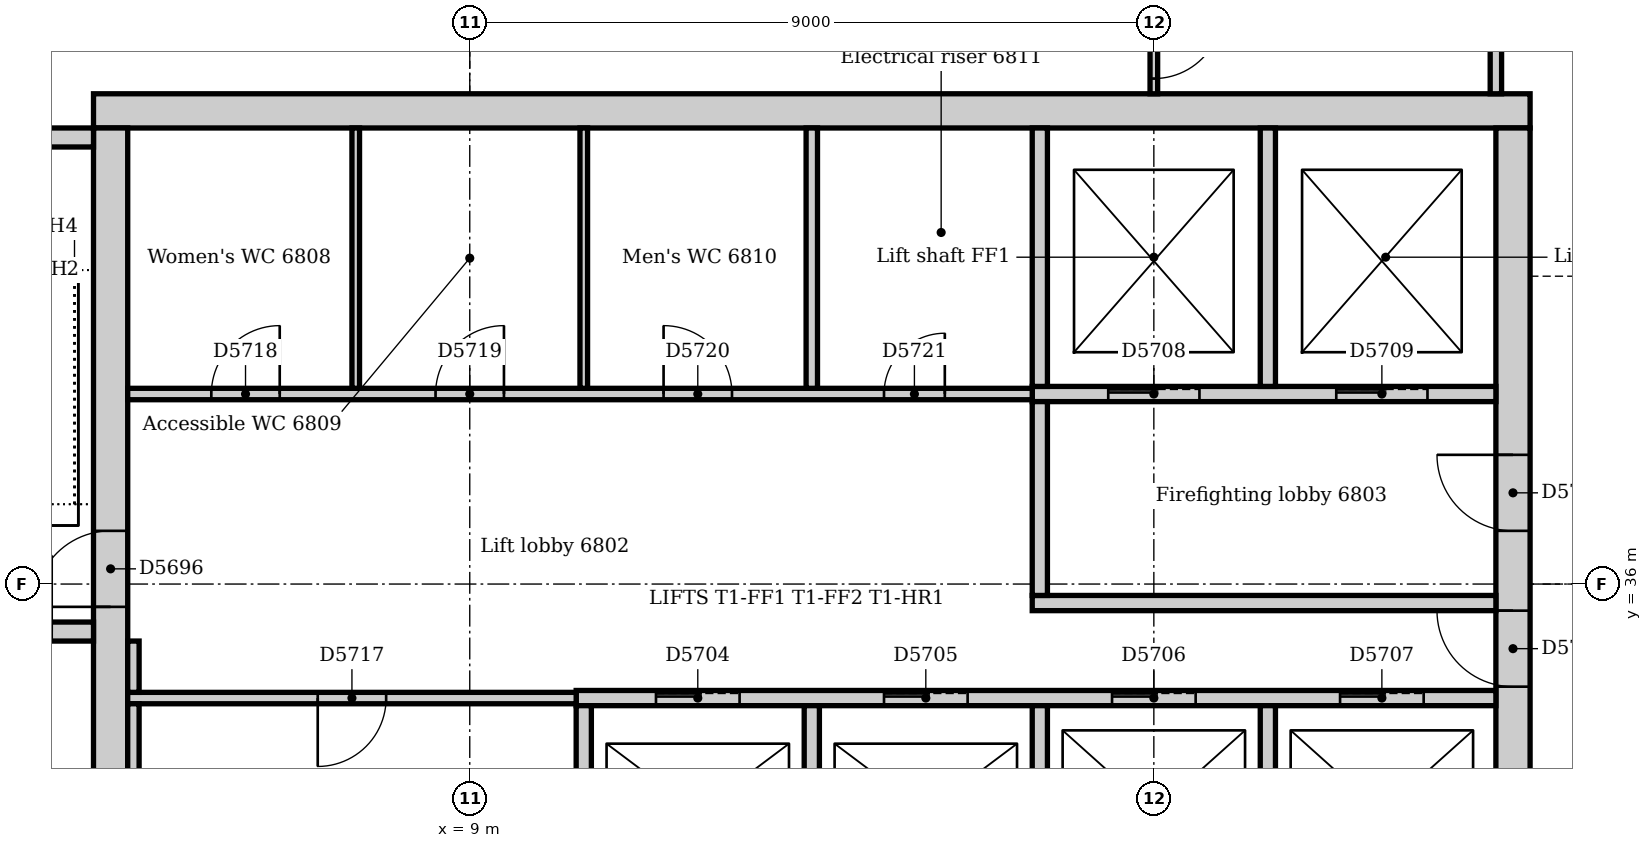
"""IFC4 building model, lengths in metres.
Left out: names, types, materials, properties, quantities, classifications, styles, units other than length and angle.
Written with IfcOpenShell. Run it as: python <this file> out.ifc"""

import sys

from ifc_helpers import new_model, si_unit, direction, frame, frame_2d, origin, place, context, subcontext, project, spatial, rectangle, extrude, element, fill, save


model = new_model("IFC4")
c1 = context("Model", 3, precision=1e-05, world=origin(), true_north=direction((0.0, 1.0)))
c2 = subcontext(c1, "Body", "Model", "MODEL_VIEW")
j1 = project(units=[si_unit("LENGTHUNIT", "METRE"), si_unit("PLANEANGLEUNIT", "RADIAN")], contexts=[c1])
p1 = place(None, origin())
s1 = spatial("IfcSite", under=j1, at=p1, CompositionType="ELEMENT")
p2 = place(p1, origin())
s2 = spatial("IfcBuilding", under=s1, at=p2, CompositionType="ELEMENT")
p3 = place(p2, frame((0.0, 0.0, 283.0)))
s3 = spatial("IfcBuildingStorey", under=s2, at=p3, CompositionType="ELEMENT", Elevation=283.0)
p4 = place(p3, frame((22.95, 42.225, 0.0), z_axis=(0.0, 0.0, 1.0), x_axis=(-1.0, 0.0, 0.0)))
e1 = element("IfcWall", 1, at=p4, inside=s3, PredefinedType="SOLIDWALL", context=c2, shape_type="SweptSolid", body=[
    extrude(rectangle(XDim=18.9, YDim=0.45, at=frame_2d((9.45, 0.0))), origin(), (0.0, 0.0, 1.0), 8.0),
])
p5 = place(p3, frame((22.725, 31.5, 0.0), z_axis=(0.0, 0.0, 1.0), x_axis=(0.0, 1.0, 0.0)))
e2 = element("IfcWall", 2, at=p5, inside=s3, PredefinedType="SOLIDWALL", context=c2, shape_type="SweptSolid", body=[
    extrude(rectangle(XDim=10.5, YDim=0.45, at=frame_2d((5.25, 0.0))), origin(), (0.0, 0.0, 1.0), 8.0),
])
p6 = place(p5, frame((3.15, 0.0, 0.0)))
e3 = element("IfcOpeningElement", 3, at=p6, cuts=e2, PredefinedType="OPENING", context=c2, shape_type="SweptSolid", body=[
    extrude(rectangle(XDim=1.0, YDim=2.1, at=frame_2d((0.5, 1.05))), frame((0.0, 0.235, 0.0), z_axis=(0.0, -1.0, 0.0), x_axis=(1.0, 0.0, 0.0)), (0.0, 0.0, 1.0), 0.47),
])
p7 = place(p5, frame((5.2, 0.0, 0.0)))
e4 = element("IfcOpeningElement", 4, at=p7, cuts=e2, PredefinedType="OPENING", context=c2, shape_type="SweptSolid", body=[
    extrude(rectangle(XDim=1.0, YDim=2.1, at=frame_2d((0.5, 1.05))), frame((0.0, 0.235, 0.0), z_axis=(0.0, -1.0, 0.0), x_axis=(1.0, 0.0, 0.0)), (0.0, 0.0, 1.0), 0.47),
])
p8 = place(p3, frame((4.275, 42.0, 0.0), z_axis=(0.0, 0.0, 1.0), x_axis=(0.0, -1.0, 0.0)))
e5 = element("IfcWall", 5, at=p8, inside=s3, PredefinedType="SOLIDWALL", context=c2, shape_type="SweptSolid", body=[
    extrude(rectangle(XDim=10.5, YDim=0.45, at=frame_2d((5.25, 0.0))), origin(), (0.0, 0.0, 1.0), 8.0),
])
p9 = place(p8, frame((5.3, 0.0, 0.0)))
e6 = element("IfcOpeningElement", 6, at=p9, cuts=e5, PredefinedType="OPENING", context=c2, shape_type="SweptSolid", body=[
    extrude(rectangle(XDim=1.0, YDim=2.1, at=frame_2d((0.5, 1.05))), frame((0.0, 0.235, 0.0), z_axis=(0.0, -1.0, 0.0), x_axis=(1.0, 0.0, 0.0)), (0.0, 0.0, 1.0), 0.47),
])
p10 = place(p3, frame((0.36, 35.375, 0.0), z_axis=(0.0, 0.0, 1.0), x_axis=(1.0, 0.0, 0.0)))
e7 = element("IfcWall", 7, at=p10, inside=s3, PredefinedType="SOLIDWALL", context=c2, shape_type="SweptSolid", body=[
    extrude(rectangle(XDim=3.69, YDim=0.25, at=frame_2d((1.845, 0.0))), origin(), (0.0, 0.0, 1.0), 8.0),
])
p11 = place(p10, frame((2.14, 0.0, 0.0)))
e8 = element("IfcOpeningElement", 8, at=p11, cuts=e7, PredefinedType="OPENING", context=c2, shape_type="SweptSolid", body=[
    extrude(rectangle(XDim=1.0, YDim=2.1, at=frame_2d((0.5, 1.05))), frame((0.0, 0.135, 0.0), z_axis=(0.0, -1.0, 0.0), x_axis=(1.0, 0.0, 0.0)), (0.0, 0.0, 1.0), 0.27),
])
p12 = place(p3, frame((4.05, 41.875, 0.0), z_axis=(0.0, 0.0, 1.0), x_axis=(-1.0, 0.0, 0.0)))
e9 = element("IfcWall", 9, at=p12, inside=s3, PredefinedType="SOLIDWALL", context=c2, shape_type="SweptSolid", body=[
    extrude(rectangle(XDim=3.69, YDim=0.25, at=frame_2d((1.845, 0.0))), origin(), (0.0, 0.0, 1.0), 8.0),
])
p13 = place(p3, frame((16.4, 35.75, 0.0), z_axis=(0.0, 0.0, 1.0), x_axis=(1.0, 0.0, 0.0)))
e10 = element("IfcWall", 10, at=p13, inside=s3, PredefinedType="PARTITIONING", context=c2, shape_type="SweptSolid", body=[
    extrude(rectangle(XDim=6.1, YDim=0.2, at=frame_2d((3.05, 0.0))), origin(), (0.0, 0.0, 1.0), 7.7),
])
p14 = place(p3, frame((16.4, 38.5, 0.0), z_axis=(0.0, 0.0, 1.0), x_axis=(1.0, 0.0, 0.0)))
e11 = element("IfcWall", 11, at=p14, inside=s3, PredefinedType="PARTITIONING", context=c2, shape_type="SweptSolid", body=[
    extrude(rectangle(XDim=6.1, YDim=0.2, at=frame_2d((3.05, 0.0))), origin(), (0.0, 0.0, 1.0), 7.7),
])
p15 = place(p14, frame((1.0, 0.0, 0.0)))
e12 = element("IfcOpeningElement", 12, at=p15, cuts=e11, PredefinedType="OPENING", context=c2, shape_type="SweptSolid", body=[
    extrude(rectangle(XDim=1.2, YDim=2.1, at=frame_2d((0.6, 1.05))), frame((0.0, 0.11, 0.0), z_axis=(0.0, -1.0, 0.0), x_axis=(1.0, 0.0, 0.0)), (0.0, 0.0, 1.0), 0.22),
])
p16 = place(p14, frame((4.0, 0.0, 0.0)))
e13 = element("IfcOpeningElement", 13, at=p16, cuts=e11, PredefinedType="OPENING", context=c2, shape_type="SweptSolid", body=[
    extrude(rectangle(XDim=1.2, YDim=2.1, at=frame_2d((0.6, 1.05))), frame((0.0, 0.11, 0.0), z_axis=(0.0, -1.0, 0.0), x_axis=(1.0, 0.0, 0.0)), (0.0, 0.0, 1.0), 0.22),
])
p17 = place(p3, frame((16.5, 35.85, 0.0), z_axis=(0.0, 0.0, 1.0), x_axis=(0.0, 1.0, 0.0)))
e14 = element("IfcWall", 14, at=p17, inside=s3, PredefinedType="PARTITIONING", context=c2, shape_type="SweptSolid", body=[
    extrude(rectangle(XDim=2.55, YDim=0.2, at=frame_2d((1.275, 0.0))), origin(), (0.0, 0.0, 1.0), 7.7),
])
p18 = place(p3, frame((10.4, 34.5, 0.0), z_axis=(0.0, 0.0, 1.0), x_axis=(1.0, 0.0, 0.0)))
e15 = element("IfcWall", 15, at=p18, inside=s3, PredefinedType="PARTITIONING", context=c2, shape_type="SweptSolid", body=[
    extrude(rectangle(XDim=12.1, YDim=0.2, at=frame_2d((6.05, 0.0))), origin(), (0.0, 0.0, 1.0), 7.7),
])
p19 = place(p18, frame((1.05, 0.0, 0.0)))
e16 = element("IfcOpeningElement", 16, at=p19, cuts=e15, PredefinedType="OPENING", context=c2, shape_type="SweptSolid", body=[
    extrude(rectangle(XDim=1.1, YDim=2.1, at=frame_2d((0.55, 1.05))), frame((0.0, 0.11, 0.0), z_axis=(0.0, -1.0, 0.0), x_axis=(1.0, 0.0, 0.0)), (0.0, 0.0, 1.0), 0.22),
])
p20 = place(p18, frame((4.05, 0.0, 0.0)))
e17 = element("IfcOpeningElement", 17, at=p20, cuts=e15, PredefinedType="OPENING", context=c2, shape_type="SweptSolid", body=[
    extrude(rectangle(XDim=1.1, YDim=2.1, at=frame_2d((0.55, 1.05))), frame((0.0, 0.11, 0.0), z_axis=(0.0, -1.0, 0.0), x_axis=(1.0, 0.0, 0.0)), (0.0, 0.0, 1.0), 0.22),
])
p21 = place(p18, frame((7.05, 0.0, 0.0)))
e18 = element("IfcOpeningElement", 18, at=p21, cuts=e15, PredefinedType="OPENING", context=c2, shape_type="SweptSolid", body=[
    extrude(rectangle(XDim=1.1, YDim=2.1, at=frame_2d((0.55, 1.05))), frame((0.0, 0.11, 0.0), z_axis=(0.0, -1.0, 0.0), x_axis=(1.0, 0.0, 0.0)), (0.0, 0.0, 1.0), 0.22),
])
p22 = place(p18, frame((10.05, 0.0, 0.0)))
e19 = element("IfcOpeningElement", 19, at=p22, cuts=e15, PredefinedType="OPENING", context=c2, shape_type="SweptSolid", body=[
    extrude(rectangle(XDim=1.1, YDim=2.1, at=frame_2d((0.55, 1.05))), frame((0.0, 0.11, 0.0), z_axis=(0.0, -1.0, 0.0), x_axis=(1.0, 0.0, 0.0)), (0.0, 0.0, 1.0), 0.22),
])
for number, where, z_axis, x_axis in (
    (20, (10.5, 31.75, 0.0), (0.0, 0.0, 1.0), (0.0, 1.0, 0.0)),
    (21, (13.5, 31.75, 0.0), (0.0, 0.0, 1.0), (0.0, 1.0, 0.0)),
    (22, (16.5, 31.75, 0.0), (0.0, 0.0, 1.0), (0.0, 1.0, 0.0)),
    (23, (19.5, 31.75, 0.0), (0.0, 0.0, 1.0), (0.0, 1.0, 0.0)),
):
    element("IfcWall", number, at=place(p3, frame(where, z_axis=z_axis, x_axis=x_axis)), inside=s3, PredefinedType="PARTITIONING", context=c2, shape_type="SweptSolid", body=[
        extrude(rectangle(XDim=2.65, YDim=0.2, at=frame_2d((1.325, 0.0))), origin(), (0.0, 0.0, 1.0), 7.7),
    ])
for number, where, z_axis, x_axis in (
    (24, (16.5, 38.6, 0.0), (0.0, 0.0, 1.0), (0.0, 1.0, 0.0)),
    (25, (19.5, 38.6, 0.0), (0.0, 0.0, 1.0), (0.0, 1.0, 0.0)),
):
    element("IfcWall", number, at=place(p3, frame(where, z_axis=z_axis, x_axis=x_axis)), inside=s3, PredefinedType="PARTITIONING", context=c2, shape_type="SweptSolid", body=[
        extrude(rectangle(XDim=3.4, YDim=0.2, at=frame_2d((1.7, 0.0))), origin(), (0.0, 0.0, 1.0), 7.7),
    ])
p23 = place(p3, frame((4.5, 38.5, 0.0), z_axis=(0.0, 0.0, 1.0), x_axis=(1.0, 0.0, 0.0)))
e26 = element("IfcWall", 26, at=p23, inside=s3, PredefinedType="PARTITIONING", context=c2, shape_type="SweptSolid", body=[
    extrude(rectangle(XDim=11.9, YDim=0.15, at=frame_2d((5.95, 0.0))), origin(), (0.0, 0.0, 1.0), 7.7),
])
p24 = place(p23, frame((1.1, 0.0, 0.0)))
e27 = element("IfcOpeningElement", 27, at=p24, cuts=e26, PredefinedType="OPENING", context=c2, shape_type="SweptSolid", body=[
    extrude(rectangle(XDim=0.9, YDim=2.1, at=frame_2d((0.45, 1.05))), frame((0.0, 0.085, 0.0), z_axis=(0.0, -1.0, 0.0), x_axis=(1.0, 0.0, 0.0)), (0.0, 0.0, 1.0), 0.17),
])
p25 = place(p23, frame((4.05, 0.0, 0.0)))
e28 = element("IfcOpeningElement", 28, at=p25, cuts=e26, PredefinedType="OPENING", context=c2, shape_type="SweptSolid", body=[
    extrude(rectangle(XDim=0.9, YDim=2.1, at=frame_2d((0.45, 1.05))), frame((0.0, 0.085, 0.0), z_axis=(0.0, -1.0, 0.0), x_axis=(1.0, 0.0, 0.0)), (0.0, 0.0, 1.0), 0.17),
])
p26 = place(p23, frame((7.05, 0.0, 0.0)))
e29 = element("IfcOpeningElement", 29, at=p26, cuts=e26, PredefinedType="OPENING", context=c2, shape_type="SweptSolid", body=[
    extrude(rectangle(XDim=0.9, YDim=2.1, at=frame_2d((0.45, 1.05))), frame((0.0, 0.085, 0.0), z_axis=(0.0, -1.0, 0.0), x_axis=(1.0, 0.0, 0.0)), (0.0, 0.0, 1.0), 0.17),
])
p27 = place(p23, frame((9.95, 0.0, 0.0)))
e30 = element("IfcOpeningElement", 30, at=p27, cuts=e26, PredefinedType="OPENING", context=c2, shape_type="SweptSolid", body=[
    extrude(rectangle(XDim=0.8, YDim=2.1, at=frame_2d((0.4, 1.05))), frame((0.0, 0.085, 0.0), z_axis=(0.0, -1.0, 0.0), x_axis=(1.0, 0.0, 0.0)), (0.0, 0.0, 1.0), 0.17),
])
p28 = place(p3, frame((4.5, 34.5, 0.0), z_axis=(0.0, 0.0, 1.0), x_axis=(1.0, 0.0, 0.0)))
e31 = element("IfcWall", 31, at=p28, inside=s3, PredefinedType="PARTITIONING", context=c2, shape_type="SweptSolid", body=[
    extrude(rectangle(XDim=5.9, YDim=0.15, at=frame_2d((2.95, 0.0))), origin(), (0.0, 0.0, 1.0), 7.7),
])
p29 = place(p28, frame((2.5, 0.0, 0.0)))
e32 = element("IfcOpeningElement", 32, at=p29, cuts=e31, PredefinedType="OPENING", context=c2, shape_type="SweptSolid", body=[
    extrude(rectangle(XDim=0.9, YDim=2.1, at=frame_2d((0.45, 1.05))), frame((0.0, 0.085, 0.0), z_axis=(0.0, -1.0, 0.0), x_axis=(1.0, 0.0, 0.0)), (0.0, 0.0, 1.0), 0.17),
])
p30 = place(p3, frame((4.575, 34.575, 0.0), z_axis=(0.0, 0.0, 1.0), x_axis=(0.0, 1.0, 0.0)))
e33 = element("IfcWall", 33, at=p30, inside=s3, PredefinedType="PARTITIONING", context=c2, shape_type="SweptSolid", body=[
    extrude(rectangle(XDim=0.675, YDim=0.15, at=frame_2d((0.338, 0.0))), origin(), (0.0, 0.0, 1.0), 7.7),
])
p31 = place(p3, frame((4.575, 31.75, 0.0), z_axis=(0.0, 0.0, 1.0), x_axis=(0.0, 1.0, 0.0)))
e34 = element("IfcWall", 34, at=p31, inside=s3, PredefinedType="PARTITIONING", context=c2, shape_type="SweptSolid", body=[
    extrude(rectangle(XDim=2.675, YDim=0.15, at=frame_2d((1.337, 0.0))), origin(), (0.0, 0.0, 1.0), 7.7),
])
p32 = place(p3, frame((22.5, 42.45, 0.0), z_axis=(0.0, 0.0, 1.0), x_axis=(0.0, 1.0, 0.0)))
e35 = element("IfcWall", 35, at=p32, inside=s3, PredefinedType="PARTITIONING", context=c2, shape_type="SweptSolid", body=[
    extrude(rectangle(XDim=2.475, YDim=0.15, at=frame_2d((1.238, 0.0))), origin(), (0.0, 0.0, 1.0), 7.7),
])
p33 = place(p3, frame((13.5, 38.575, 0.0), z_axis=(0.0, 0.0, 1.0), x_axis=(0.0, 1.0, 0.0)))
e36 = element("IfcWall", 36, at=p33, inside=s3, PredefinedType="PARTITIONING", context=c2, shape_type="SweptSolid", body=[
    extrude(rectangle(XDim=3.425, YDim=0.15, at=frame_2d((1.712, 0.0))), origin(), (0.0, 0.0, 1.0), 7.7),
])
p34 = place(p3, frame((18.0, 42.45, 0.0), z_axis=(0.0, 0.0, 1.0), x_axis=(0.0, 1.0, 0.0)))
e37 = element("IfcWall", 37, at=p34, inside=s3, PredefinedType="PARTITIONING", context=c2, shape_type="SweptSolid", body=[
    extrude(rectangle(XDim=1.3, YDim=0.1, at=frame_2d((0.65, 0.0))), origin(), (0.0, 0.0, 1.0), 7.502),
])
p35 = place(p34, frame((0.2, 0.0, 0.0)))
e38 = element("IfcOpeningElement", 38, at=p35, cuts=e37, PredefinedType="OPENING", context=c2, shape_type="SweptSolid", body=[
    extrude(rectangle(XDim=0.9, YDim=2.1, at=frame_2d((0.45, 1.05))), frame((0.0, 0.06, 0.0), z_axis=(0.0, -1.0, 0.0), x_axis=(1.0, 0.0, 0.0)), (0.0, 0.0, 1.0), 0.12),
])
for number, where, z_axis, x_axis in (
    (39, (7.5, 38.575, 0.0), (0.0, 0.0, 1.0), (0.0, 1.0, 0.0)),
    (40, (10.5, 38.575, 0.0), (0.0, 0.0, 1.0), (0.0, 1.0, 0.0)),
):
    element("IfcWall", number, at=place(p3, frame(where, z_axis=z_axis, x_axis=x_axis)), inside=s3, PredefinedType="PARTITIONING", context=c2, shape_type="SweptSolid", body=[
        extrude(rectangle(XDim=3.425, YDim=0.1, at=frame_2d((1.712, 0.0))), origin(), (0.0, 0.0, 1.0), 7.7),
    ])
p36 = place(p9, frame((1.0, 0.0, 0.0), z_axis=(0.0, 0.0, 1.0), x_axis=(-1.0, 0.0, 0.0)))
e41 = element("IfcDoor", 41, at=p36, inside=s3, OperationType="SINGLE_SWING_LEFT", PredefinedType="DOOR", context=c2, shape_type="SweptSolid", body=[
    extrude(rectangle(XDim=1.0, YDim=2.1, at=frame_2d((0.5, 1.05))), frame((0.0, 0.025, 0.0), z_axis=(0.0, -1.0, 0.0), x_axis=(1.0, 0.0, 0.0)), (0.0, 0.0, 1.0), 0.05),
])
fill(e6, e41)
p37 = place(p19, origin())
e42 = element("IfcDoor", 42, at=p37, inside=s3, OperationType="SLIDING_TO_LEFT", PredefinedType="DOOR", context=c2, shape_type="SweptSolid", body=[
    extrude(rectangle(XDim=1.1, YDim=2.1, at=frame_2d((0.55, 1.05))), frame((0.0, 0.025, 0.0), z_axis=(0.0, -1.0, 0.0), x_axis=(1.0, 0.0, 0.0)), (0.0, 0.0, 1.0), 0.05),
])
fill(e16, e42)
p38 = place(p20, origin())
e43 = element("IfcDoor", 43, at=p38, inside=s3, OperationType="SLIDING_TO_LEFT", PredefinedType="DOOR", context=c2, shape_type="SweptSolid", body=[
    extrude(rectangle(XDim=1.1, YDim=2.1, at=frame_2d((0.55, 1.05))), frame((0.0, 0.025, 0.0), z_axis=(0.0, -1.0, 0.0), x_axis=(1.0, 0.0, 0.0)), (0.0, 0.0, 1.0), 0.05),
])
fill(e17, e43)
p39 = place(p21, origin())
e44 = element("IfcDoor", 44, at=p39, inside=s3, OperationType="SLIDING_TO_LEFT", PredefinedType="DOOR", context=c2, shape_type="SweptSolid", body=[
    extrude(rectangle(XDim=1.1, YDim=2.1, at=frame_2d((0.55, 1.05))), frame((0.0, 0.025, 0.0), z_axis=(0.0, -1.0, 0.0), x_axis=(1.0, 0.0, 0.0)), (0.0, 0.0, 1.0), 0.05),
])
fill(e18, e44)
p40 = place(p22, origin())
e45 = element("IfcDoor", 45, at=p40, inside=s3, OperationType="SLIDING_TO_LEFT", PredefinedType="DOOR", context=c2, shape_type="SweptSolid", body=[
    extrude(rectangle(XDim=1.1, YDim=2.1, at=frame_2d((0.55, 1.05))), frame((0.0, 0.025, 0.0), z_axis=(0.0, -1.0, 0.0), x_axis=(1.0, 0.0, 0.0)), (0.0, 0.0, 1.0), 0.05),
])
fill(e19, e45)
p41 = place(p15, origin())
e46 = element("IfcDoor", 46, at=p41, inside=s3, OperationType="SLIDING_TO_LEFT", PredefinedType="DOOR", context=c2, shape_type="SweptSolid", body=[
    extrude(rectangle(XDim=1.2, YDim=2.1, at=frame_2d((0.6, 1.05))), frame((0.0, 0.025, 0.0), z_axis=(0.0, -1.0, 0.0), x_axis=(1.0, 0.0, 0.0)), (0.0, 0.0, 1.0), 0.05),
])
fill(e12, e46)
p42 = place(p16, origin())
e47 = element("IfcDoor", 47, at=p42, inside=s3, OperationType="SLIDING_TO_LEFT", PredefinedType="DOOR", context=c2, shape_type="SweptSolid", body=[
    extrude(rectangle(XDim=1.2, YDim=2.1, at=frame_2d((0.6, 1.05))), frame((0.0, 0.025, 0.0), z_axis=(0.0, -1.0, 0.0), x_axis=(1.0, 0.0, 0.0)), (0.0, 0.0, 1.0), 0.05),
])
fill(e13, e47)
p43 = place(p6, origin())
e48 = element("IfcDoor", 48, at=p43, inside=s3, OperationType="SINGLE_SWING_RIGHT", PredefinedType="DOOR", context=c2, shape_type="SweptSolid", body=[
    extrude(rectangle(XDim=1.0, YDim=2.1, at=frame_2d((0.5, 1.05))), frame((0.0, 0.025, 0.0), z_axis=(0.0, -1.0, 0.0), x_axis=(1.0, 0.0, 0.0)), (0.0, 0.0, 1.0), 0.05),
])
fill(e3, e48)
p44 = place(p7, origin())
e49 = element("IfcDoor", 49, at=p44, inside=s3, OperationType="SINGLE_SWING_RIGHT", PredefinedType="DOOR", context=c2, shape_type="SweptSolid", body=[
    extrude(rectangle(XDim=1.0, YDim=2.1, at=frame_2d((0.5, 1.05))), frame((0.0, 0.025, 0.0), z_axis=(0.0, -1.0, 0.0), x_axis=(1.0, 0.0, 0.0)), (0.0, 0.0, 1.0), 0.05),
])
fill(e4, e49)
p45 = place(p29, frame((0.9, 0.0, 0.0), z_axis=(0.0, 0.0, 1.0), x_axis=(-1.0, 0.0, 0.0)))
e50 = element("IfcDoor", 50, at=p45, inside=s3, OperationType="SINGLE_SWING_RIGHT", PredefinedType="DOOR", context=c2, shape_type="SweptSolid", body=[
    extrude(rectangle(XDim=0.9, YDim=2.1, at=frame_2d((0.45, 1.05))), frame((0.0, 0.025, 0.0), z_axis=(0.0, -1.0, 0.0), x_axis=(1.0, 0.0, 0.0)), (0.0, 0.0, 1.0), 0.05),
])
fill(e32, e50)
p46 = place(p24, origin())
e51 = element("IfcDoor", 51, at=p46, inside=s3, OperationType="SINGLE_SWING_RIGHT", PredefinedType="DOOR", context=c2, shape_type="SweptSolid", body=[
    extrude(rectangle(XDim=0.9, YDim=2.1, at=frame_2d((0.45, 1.05))), frame((0.0, 0.025, 0.0), z_axis=(0.0, -1.0, 0.0), x_axis=(1.0, 0.0, 0.0)), (0.0, 0.0, 1.0), 0.05),
])
fill(e27, e51)
p47 = place(p25, origin())
e52 = element("IfcDoor", 52, at=p47, inside=s3, OperationType="SINGLE_SWING_RIGHT", PredefinedType="DOOR", context=c2, shape_type="SweptSolid", body=[
    extrude(rectangle(XDim=0.9, YDim=2.1, at=frame_2d((0.45, 1.05))), frame((0.0, 0.025, 0.0), z_axis=(0.0, -1.0, 0.0), x_axis=(1.0, 0.0, 0.0)), (0.0, 0.0, 1.0), 0.05),
])
fill(e28, e52)
p48 = place(p26, origin())
e53 = element("IfcDoor", 53, at=p48, inside=s3, OperationType="SINGLE_SWING_LEFT", PredefinedType="DOOR", context=c2, shape_type="SweptSolid", body=[
    extrude(rectangle(XDim=0.9, YDim=2.1, at=frame_2d((0.45, 1.05))), frame((0.0, 0.025, 0.0), z_axis=(0.0, -1.0, 0.0), x_axis=(1.0, 0.0, 0.0)), (0.0, 0.0, 1.0), 0.05),
])
fill(e29, e53)
p49 = place(p27, origin())
e54 = element("IfcDoor", 54, at=p49, inside=s3, OperationType="SINGLE_SWING_RIGHT", PredefinedType="DOOR", context=c2, shape_type="SweptSolid", body=[
    extrude(rectangle(XDim=0.8, YDim=2.1, at=frame_2d((0.4, 1.05))), frame((0.0, 0.025, 0.0), z_axis=(0.0, -1.0, 0.0), x_axis=(1.0, 0.0, 0.0)), (0.0, 0.0, 1.0), 0.05),
])
fill(e30, e54)
p50 = place(p35, frame((0.9, 0.0, 0.0), z_axis=(0.0, 0.0, 1.0), x_axis=(-1.0, 0.0, 0.0)))
e55 = element("IfcDoor", 55, at=p50, inside=s3, OperationType="SINGLE_SWING_LEFT", PredefinedType="DOOR", context=c2, shape_type="SweptSolid", body=[
    extrude(rectangle(XDim=0.9, YDim=2.1, at=frame_2d((0.45, 1.05))), frame((0.0, 0.025, 0.0), z_axis=(0.0, -1.0, 0.0), x_axis=(1.0, 0.0, 0.0)), (0.0, 0.0, 1.0), 0.05),
])
fill(e38, e55)
save(model, sys.argv[1])
